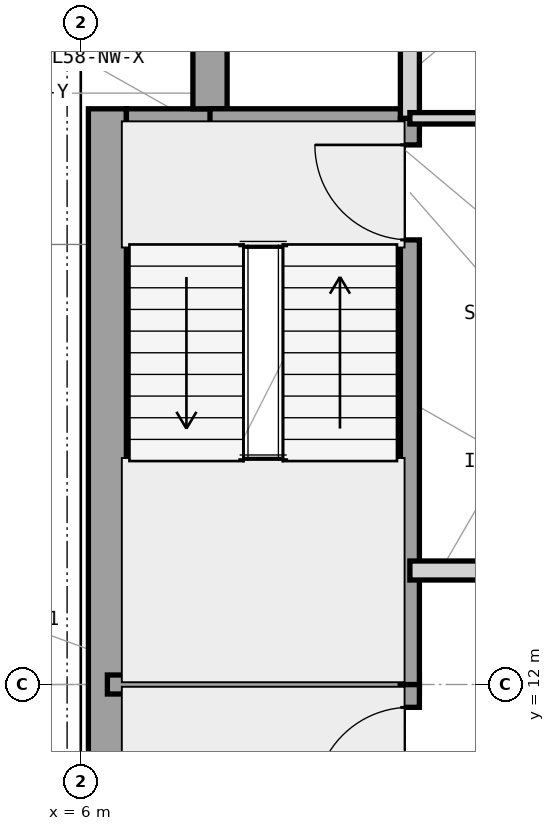
"""IFC4 building model, lengths in metres.
Left out: names, types, materials, properties, quantities, classifications, styles, units other than length and angle.
Written with IfcOpenShell. Run it as: python <this file> out.ifc"""

import sys

from ifc_helpers import new_model, si_unit, direction, frame, frame_2d, origin, place, context, subcontext, project, spatial, rectangle, extrude, element, fill, save


model = new_model("IFC4")
c1 = context("Model", 3, precision=1e-05, world=origin(), true_north=direction((0.0, 1.0)))
c2 = subcontext(c1, "Body", "Model", "MODEL_VIEW")
j1 = project(units=[si_unit("LENGTHUNIT", "METRE"), si_unit("PLANEANGLEUNIT", "RADIAN")], contexts=[c1])
p1 = place(None, origin())
s1 = spatial("IfcSite", under=j1, at=p1, CompositionType="ELEMENT")
p2 = place(p1, origin())
s2 = spatial("IfcBuilding", under=s1, at=p2, CompositionType="ELEMENT")
p3 = place(p2, frame((0.0, 0.0, 239.1)))
s3 = spatial("IfcBuildingStorey", under=s2, at=p3, CompositionType="ELEMENT", Elevation=239.1)
p4 = place(p3, frame((6.35, 4.425, 0.0), z_axis=(0.0, 0.0, 1.0), x_axis=(0.0, 1.0, 0.0)))
e1 = element("IfcWall", 1, at=p4, inside=s3, PredefinedType="SHEAR", context=c2, shape_type="SweptSolid", body=[
    extrude(rectangle(XDim=15.15, YDim=0.5, at=frame_2d((7.575, 0.0))), origin(), (0.0, 0.0, 1.0), 3.9),
])
p5 = place(p3, frame((6.6, 19.35, 0.0), z_axis=(0.0, 0.0, 1.0), x_axis=(1.0, 0.0, 0.0)))
e2 = element("IfcWall", 2, at=p5, inside=s3, PredefinedType="SHEAR", context=c2, shape_type="SweptSolid", body=[
    extrude(rectangle(XDim=1.325, YDim=0.45, at=frame_2d((0.663, 0.0))), origin(), (0.0, 0.0, 1.0), 3.9),
])
p6 = place(p3, frame((7.7, 19.575, 0.0), z_axis=(0.0, 0.0, 1.0), x_axis=(0.0, 1.0, 0.0)))
e3 = element("IfcWall", 3, at=p6, inside=s3, PredefinedType="SHEAR", context=c2, shape_type="SweptSolid", body=[
    extrude(rectangle(XDim=0.825, YDim=0.45, at=frame_2d((0.413, 0.0))), origin(), (0.0, 0.0, 1.0), 3.9),
])
p7 = place(p3, frame((6.35, 12.0, 0.0), z_axis=(0.0, 0.0, 1.0), x_axis=(1.0, 0.0, 0.0)))
e4 = element("IfcWall", 4, at=p7, inside=s3, PredefinedType="SHEAR", context=c2, shape_type="SweptSolid", body=[
    extrude(rectangle(XDim=4.105, YDim=0.25, at=frame_2d((2.052, 0.0))), origin(), (0.0, 0.0, 1.0), 3.9),
])
p8 = place(p3, frame((7.7, 19.45, 0.0), z_axis=(0.0, 0.0, 1.0), x_axis=(1.0, 0.0, 0.0)))
e5 = element("IfcWall", 5, at=p8, inside=s3, PredefinedType="SHEAR", context=c2, shape_type="SweptSolid", body=[
    extrude(rectangle(XDim=2.755, YDim=0.25, at=frame_2d((1.377, 0.0))), origin(), (0.0, 0.0, 1.0), 3.9),
])
p9 = place(p3, frame((10.33, 4.55, 0.0), z_axis=(0.0, 0.0, 1.0), x_axis=(0.0, 1.0, 0.0)))
e6 = element("IfcWall", 6, at=p9, inside=s3, PredefinedType="SHEAR", context=c2, shape_type="SweptSolid", body=[
    extrude(rectangle(XDim=7.45, YDim=0.25, at=frame_2d((3.725, 0.0))), origin(), (0.0, 0.0, 1.0), 3.9),
])
p10 = place(p9, frame((5.9, 0.0, 0.0)))
e7 = element("IfcOpeningElement", 7, at=p10, cuts=e6, PredefinedType="OPENING", context=c2, shape_type="SweptSolid", body=[
    extrude(rectangle(XDim=1.25, YDim=2.2, at=frame_2d((0.625, 1.1))), frame((0.0, 0.135, 0.0), z_axis=(0.0, -1.0, 0.0), x_axis=(1.0, 0.0, 0.0)), (0.0, 0.0, 1.0), 0.27),
])
p11 = place(p3, frame((10.33, 12.0, 0.0), z_axis=(0.0, 0.0, 1.0), x_axis=(0.0, 1.0, 0.0)))
e8 = element("IfcWall", 8, at=p11, inside=s3, PredefinedType="SHEAR", context=c2, shape_type="SweptSolid", body=[
    extrude(rectangle(XDim=7.45, YDim=0.25, at=frame_2d((3.725, 0.0))), origin(), (0.0, 0.0, 1.0), 3.9),
])
p12 = place(p11, frame((5.85, 0.0, 0.0)))
e9 = element("IfcOpeningElement", 9, at=p12, cuts=e8, PredefinedType="OPENING", context=c2, shape_type="SweptSolid", body=[
    extrude(rectangle(XDim=1.25, YDim=2.2, at=frame_2d((0.625, 1.1))), frame((0.0, 0.135, 0.0), z_axis=(0.0, -1.0, 0.0), x_axis=(1.0, 0.0, 0.0)), (0.0, 0.0, 1.0), 0.27),
])
p13 = place(p3, frame((10.33, 19.45, 0.0), z_axis=(0.0, 0.0, 1.0), x_axis=(0.0, 1.0, 0.0)))
e10 = element("IfcWall", 10, at=p13, inside=s3, PredefinedType="PARTITIONING", context=c2, shape_type="SweptSolid", body=[
    extrude(rectangle(XDim=1.2, YDim=0.25, at=frame_2d((0.6, 0.0))), origin(), (0.0, 0.0, 1.0), 3.69),
])
p14 = place(p3, frame((10.33, 13.5, 0.0), z_axis=(0.0, 0.0, 1.0), x_axis=(1.0, 0.0, 0.0)))
e11 = element("IfcWall", 11, at=p14, inside=s3, PredefinedType="PARTITIONING", context=c2, shape_type="SweptSolid", body=[
    extrude(rectangle(XDim=1.62, YDim=0.25, at=frame_2d((0.81, 0.0))), origin(), (0.0, 0.0, 1.0), 3.073),
])
p15 = place(p3, frame((10.33, 19.45, 0.0), z_axis=(0.0, 0.0, 1.0), x_axis=(1.0, 0.0, 0.0)))
e12 = element("IfcWall", 12, at=p15, inside=s3, PredefinedType="PARTITIONING", context=c2, shape_type="SweptSolid", body=[
    extrude(rectangle(XDim=3.82, YDim=0.15, at=frame_2d((1.91, 0.0))), origin(), (0.0, 0.0, 1.0), 3.69),
])
p16 = place(p15, frame((1.25, 0.0, 0.0)))
e13 = element("IfcOpeningElement", 13, at=p16, cuts=e12, PredefinedType="OPENING", context=c2, shape_type="SweptSolid", body=[
    extrude(rectangle(XDim=0.95, YDim=2.1, at=frame_2d((0.475, 1.05))), frame((0.0, 0.085, 0.0), z_axis=(0.0, -1.0, 0.0), x_axis=(1.0, 0.0, 0.0)), (0.0, 0.0, 1.0), 0.17),
])
p17 = place(p10, origin())
e14 = element("IfcDoor", 14, at=p17, inside=s3, OperationType="SINGLE_SWING_LEFT", PredefinedType="DOOR", context=c2, shape_type="SweptSolid", body=[
    extrude(rectangle(XDim=1.25, YDim=2.2, at=frame_2d((0.625, 1.1))), frame((0.0, 0.025, 0.0), z_axis=(0.0, -1.0, 0.0), x_axis=(1.0, 0.0, 0.0)), (0.0, 0.0, 1.0), 0.05),
])
fill(e7, e14)
p18 = place(p12, origin())
e15 = element("IfcDoor", 15, at=p18, inside=s3, OperationType="SINGLE_SWING_RIGHT", PredefinedType="DOOR", context=c2, shape_type="SweptSolid", body=[
    extrude(rectangle(XDim=1.25, YDim=2.2, at=frame_2d((0.625, 1.1))), frame((0.0, 0.025, 0.0), z_axis=(0.0, -1.0, 0.0), x_axis=(1.0, 0.0, 0.0)), (0.0, 0.0, 1.0), 0.05),
])
fill(e9, e15)
save(model, sys.argv[1])
